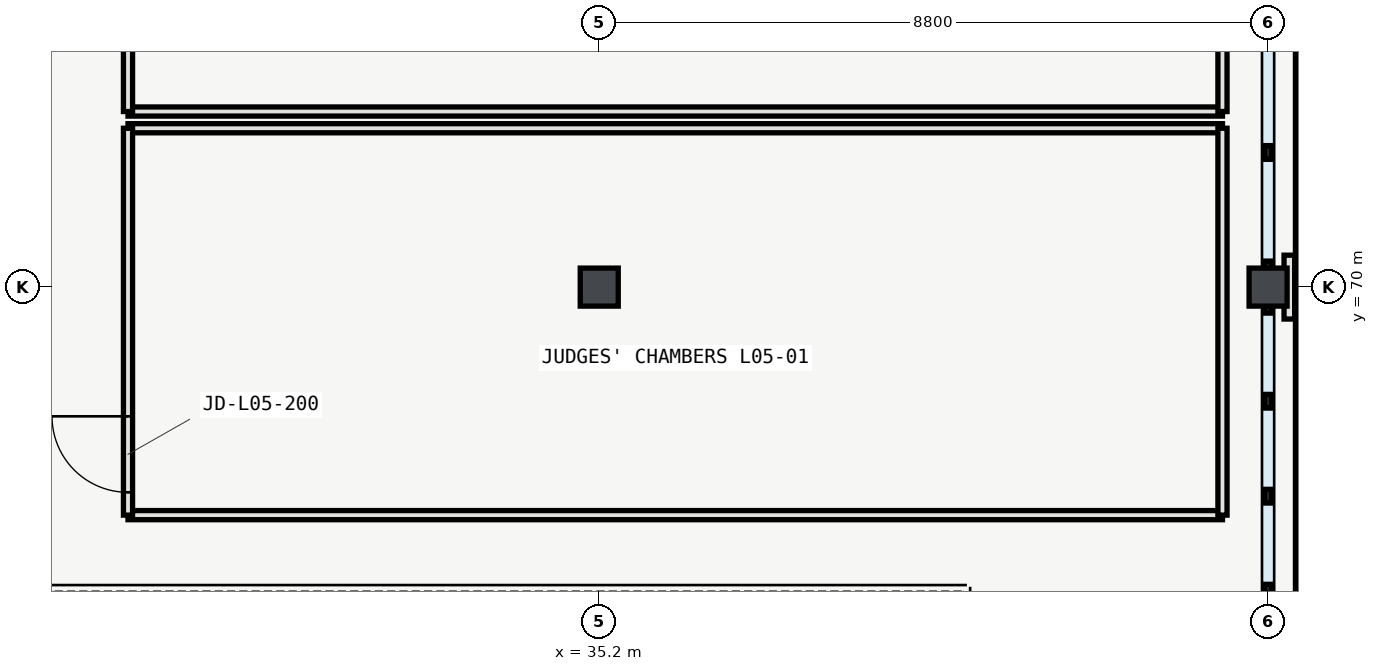
"""IFC4 building model, lengths in metres.
Left out: names, types, materials, properties, quantities, classifications, styles, units other than length and angle.
Written with IfcOpenShell. Run it as: python <this file> out.ifc"""

import sys

from ifc_helpers import new_model, si_unit, direction, frame, frame_2d, origin, origin_2d, place, context, subcontext, project, spatial, rectangle, hollow_rectangle, extrude, element, fill, save


model = new_model("IFC4")
c1 = context("Model", 3, precision=1e-05, world=origin(), true_north=direction((0.0, 1.0)))
c2 = subcontext(c1, "Body", "Model", "MODEL_VIEW")
j1 = project(units=[si_unit("LENGTHUNIT", "METRE"), si_unit("PLANEANGLEUNIT", "RADIAN")], contexts=[c1])
p1 = place(None, origin())
s1 = spatial("IfcSite", under=j1, at=p1, CompositionType="ELEMENT")
p2 = place(p1, origin())
s2 = spatial("IfcBuilding", under=s1, at=p2, CompositionType="ELEMENT")
p3 = place(p2, frame((0.0, 0.0, 24.6)))
s3 = spatial("IfcBuildingStorey", under=s2, at=p3, CompositionType="ELEMENT", Elevation=24.6)
for number, where, z_axis, x_axis in (
    (1, (35.2, 70.0, 0.0), (0.0, 0.0, 1.0), (1.0, 0.0, 0.0)),
    (2, (44.0, 70.0, 0.0), (0.0, 0.0, 1.0), (1.0, 0.0, 0.0)),
):
    element("IfcColumn", number, at=place(p3, frame(where, z_axis=z_axis, x_axis=x_axis)), inside=s3, PredefinedType="COLUMN", context=c2, shape_type="SweptSolid", body=[
        extrude(hollow_rectangle(XDim=0.5, YDim=0.5, WallThickness=0.02, InnerFilletRadius=0.02, OuterFilletRadius=0.04, at=origin_2d()), origin(), (0.0, 0.0, 1.0), 4.2),
    ])
p4 = place(p3, frame((44.44, 30.0, 0.0), z_axis=(0.0, 0.0, 1.0), x_axis=(0.0, 1.0, 0.0)))
e3 = element("IfcWall", 3, at=p4, inside=s3, PredefinedType="SOLIDWALL", context=c2, shape_type="SweptSolid", body=[
    extrude(rectangle(XDim=48.0, YDim=0.16, at=frame_2d((24.0, 0.0))), origin(), (0.0, 0.0, 1.0), 0.58),
])
p5 = place(p3, frame((44.28, 69.58, 0.0), z_axis=(0.0, 0.0, 1.0), x_axis=(0.0, 1.0, 0.0)))
e4 = element("IfcWall", 4, at=p5, inside=s3, PredefinedType="SOLIDWALL", context=c2, shape_type="SweptSolid", body=[
    extrude(rectangle(XDim=0.84, YDim=0.14, at=frame_2d((0.42, 0.0))), origin(), (0.0, 0.0, 1.0), 3.94),
])
for number, where, z_axis, x_axis in (
    (5, (29.0, 67.0, 0.0), (0.0, 0.0, 1.0), (1.0, 0.0, 0.0)),
    (6, (43.4, 72.09, 0.0), (0.0, 0.0, 1.0), (-1.0, 0.0, 0.0)),
):
    element("IfcWall", number, at=place(p3, frame(where, z_axis=z_axis, x_axis=x_axis)), inside=s3, PredefinedType="PARTITIONING", context=c2, shape_type="SweptSolid", body=[
        extrude(rectangle(XDim=14.4, YDim=0.12, at=frame_2d((7.2, 0.0))), origin(), (0.0, 0.0, 1.0), 3.92),
    ])
p6 = place(p3, frame((29.0, 72.09, 0.0), z_axis=(0.0, 0.0, 1.0), x_axis=(0.0, -1.0, 0.0)))
e7 = element("IfcWall", 7, at=p6, inside=s3, PredefinedType="PARTITIONING", context=c2, shape_type="SweptSolid", body=[
    extrude(rectangle(XDim=5.09, YDim=0.12, at=frame_2d((2.545, 0.0))), origin(), (0.0, 0.0, 1.0), 3.92),
])
p7 = place(p6, frame((3.79, 0.0, 0.0)))
e8 = element("IfcOpeningElement", 8, at=p7, cuts=e7, PredefinedType="OPENING", context=c2, shape_type="SweptSolid", body=[
    extrude(rectangle(XDim=1.0, YDim=2.2, at=frame_2d((0.5, 1.1))), frame((0.0, 0.07, 0.0), z_axis=(0.0, -1.0, 0.0), x_axis=(1.0, 0.0, 0.0)), (0.0, 0.0, 1.0), 0.14),
])
p8 = place(p3, frame((43.4, 67.0, 0.0), z_axis=(0.0, 0.0, 1.0), x_axis=(0.0, 1.0, 0.0)))
e9 = element("IfcWall", 9, at=p8, inside=s3, PredefinedType="PARTITIONING", context=c2, shape_type="SweptSolid", body=[
    extrude(rectangle(XDim=5.09, YDim=0.12, at=frame_2d((2.545, 0.0))), origin(), (0.0, 0.0, 1.0), 3.92),
])
p9 = place(p3, frame((29.0, 72.31, 0.0), z_axis=(0.0, 0.0, 1.0), x_axis=(1.0, 0.0, 0.0)))
e10 = element("IfcWall", 10, at=p9, inside=s3, PredefinedType="PARTITIONING", context=c2, shape_type="SweptSolid", body=[
    extrude(rectangle(XDim=14.4, YDim=0.12, at=frame_2d((7.2, 0.0))), origin(), (0.0, 0.0, 1.0), 3.92),
])
p10 = place(p3, frame((29.0, 77.4, 0.0), z_axis=(0.0, 0.0, 1.0), x_axis=(0.0, -1.0, 0.0)))
e11 = element("IfcWall", 11, at=p10, inside=s3, PredefinedType="PARTITIONING", context=c2, shape_type="SweptSolid", body=[
    extrude(rectangle(XDim=5.09, YDim=0.12, at=frame_2d((2.545, 0.0))), origin(), (0.0, 0.0, 1.0), 3.92),
])
p11 = place(p10, frame((2.757, 0.0, 0.0)))
e12 = element("IfcOpeningElement", 12, at=p11, cuts=e11, PredefinedType="OPENING", context=c2, shape_type="SweptSolid", body=[
    extrude(rectangle(XDim=0.98, YDim=2.2, at=frame_2d((0.49, 1.1))), frame((0.0, 0.07, 0.0), z_axis=(0.0, -1.0, 0.0), x_axis=(1.0, 0.0, 0.0)), (0.0, 0.0, 1.0), 0.14),
])
p12 = place(p3, frame((43.4, 72.31, 0.0), z_axis=(0.0, 0.0, 1.0), x_axis=(0.0, 1.0, 0.0)))
e13 = element("IfcWall", 13, at=p12, inside=s3, PredefinedType="PARTITIONING", context=c2, shape_type="SweptSolid", body=[
    extrude(rectangle(XDim=5.09, YDim=0.12, at=frame_2d((2.545, 0.0))), origin(), (0.0, 0.0, 1.0), 3.92),
])
p13 = place(p7, origin())
e14 = element("IfcDoor", 14, at=p13, inside=s3, OperationType="SINGLE_SWING_LEFT", PredefinedType="DOOR", context=c2, shape_type="SweptSolid", body=[
    extrude(rectangle(XDim=1.0, YDim=2.2, at=frame_2d((0.5, 1.1))), frame((0.0, 0.025, 0.0), z_axis=(0.0, -1.0, 0.0), x_axis=(1.0, 0.0, 0.0)), (0.0, 0.0, 1.0), 0.05),
])
fill(e8, e14)
save(model, sys.argv[1])
